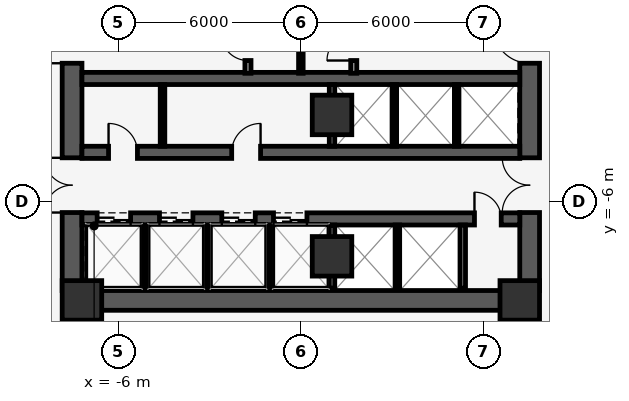
"""IFC4 building model, lengths in metres.
Left out: names, types, materials, properties, quantities, classifications, styles, units other than length and angle.
Written with IfcOpenShell. Run it as: python <this file> out.ifc"""

import sys

from ifc_helpers import new_model, si_unit, direction, frame, frame_2d, origin, origin_2d, place, context, subcontext, project, spatial, rectangle, extrude, element, fill, save


model = new_model("IFC4")
c1 = context("Model", 3, precision=1e-05, world=origin(), true_north=direction((0.0, 1.0)))
c2 = subcontext(c1, "Body", "Model", "MODEL_VIEW")
j1 = project(units=[si_unit("LENGTHUNIT", "METRE"), si_unit("PLANEANGLEUNIT", "RADIAN")], contexts=[c1])
p1 = place(None, origin())
s1 = spatial("IfcSite", under=j1, at=p1, CompositionType="ELEMENT")
p2 = place(p1, origin())
s2 = spatial("IfcBuilding", under=s1, at=p2, CompositionType="ELEMENT")
p3 = place(p2, frame((0.0, 0.0, 144.5)))
s3 = spatial("IfcBuildingStorey", under=s2, at=p3, CompositionType="ELEMENT", Elevation=144.5)
p4 = place(p3, frame((-7.525, -8.925, 0.0), z_axis=(0.0, 0.0, 1.0), x_axis=(0.0, 1.0, 0.0)))
e1 = element("IfcWall", 1, at=p4, inside=s3, PredefinedType="SHEAR", context=c2, shape_type="SweptSolid", body=[
    extrude(rectangle(XDim=9.025, YDim=0.65, at=frame_2d((4.513, 0.0))), origin(), (0.0, 0.0, 1.0), 3.85),
])
p5 = place(p4, frame((2.565, 0.0, 0.0)))
e2 = element("IfcOpeningElement", 2, at=p5, cuts=e1, PredefinedType="OPENING", context=c2, shape_type="SweptSolid", body=[
    extrude(rectangle(XDim=1.8, YDim=2.2, at=frame_2d((0.9, 1.1))), frame((0.0, 0.335, 0.0), z_axis=(0.0, -1.0, 0.0), x_axis=(1.0, 0.0, 0.0)), (0.0, 0.0, 1.0), 0.67),
])
p6 = place(p4, frame((7.475, 0.0, 0.0)))
e3 = element("IfcOpeningElement", 3, at=p6, cuts=e1, PredefinedType="OPENING", context=c2, shape_type="SweptSolid", body=[
    extrude(rectangle(XDim=1.2, YDim=2.15, at=frame_2d((0.6, 1.075))), frame((0.0, 0.335, 0.0), z_axis=(0.0, -1.0, 0.0), x_axis=(1.0, 0.0, 0.0)), (0.0, 0.0, 1.0), 0.67),
])
p7 = place(p3, frame((7.525, -8.925, 0.0), z_axis=(0.0, 0.0, 1.0), x_axis=(0.0, 1.0, 0.0)))
e4 = element("IfcWall", 4, at=p7, inside=s3, PredefinedType="SHEAR", context=c2, shape_type="SweptSolid", body=[
    extrude(rectangle(XDim=9.025, YDim=0.65, at=frame_2d((4.513, 0.0))), origin(), (0.0, 0.0, 1.0), 3.85),
])
p8 = place(p7, frame((2.565, 0.0, 0.0)))
e5 = element("IfcOpeningElement", 5, at=p8, cuts=e4, PredefinedType="OPENING", context=c2, shape_type="SweptSolid", body=[
    extrude(rectangle(XDim=1.8, YDim=2.2, at=frame_2d((0.9, 1.1))), frame((0.0, 0.335, 0.0), z_axis=(0.0, -1.0, 0.0), x_axis=(1.0, 0.0, 0.0)), (0.0, 0.0, 1.0), 0.67),
])
p9 = place(p7, frame((7.475, 0.0, 0.0)))
e6 = element("IfcOpeningElement", 6, at=p9, cuts=e4, PredefinedType="OPENING", context=c2, shape_type="SweptSolid", body=[
    extrude(rectangle(XDim=1.2, YDim=2.15, at=frame_2d((0.6, 1.075))), frame((0.0, 0.335, 0.0), z_axis=(0.0, -1.0, 0.0), x_axis=(1.0, 0.0, 0.0)), (0.0, 0.0, 1.0), 0.67),
])
p10 = place(p3, frame((-7.525, -9.25, 0.0), z_axis=(0.0, 0.0, 1.0), x_axis=(1.0, 0.0, 0.0)))
e7 = element("IfcWall", 7, at=p10, inside=s3, PredefinedType="SHEAR", context=c2, shape_type="SweptSolid", body=[
    extrude(rectangle(XDim=15.05, YDim=0.65, at=frame_2d((7.525, 0.0))), origin(), (0.0, 0.0, 1.0), 3.85),
])
p11 = place(p3, frame((-7.2, -1.95, 0.0), z_axis=(0.0, 0.0, 1.0), x_axis=(1.0, 0.0, 0.0)))
e8 = element("IfcWall", 8, at=p11, inside=s3, PredefinedType="SHEAR", context=c2, shape_type="SweptSolid", body=[
    extrude(rectangle(XDim=14.4, YDim=0.4, at=frame_2d((7.2, 0.0))), origin(), (0.0, 0.0, 1.0), 3.85),
])
p12 = place(p3, frame((-7.2, -4.38, 0.0), z_axis=(0.0, 0.0, 1.0), x_axis=(1.0, 0.0, 0.0)))
e9 = element("IfcWall", 9, at=p12, inside=s3, PredefinedType="SHEAR", context=c2, shape_type="SweptSolid", body=[
    extrude(rectangle(XDim=14.4, YDim=0.4, at=frame_2d((7.2, 0.0))), origin(), (0.0, 0.0, 1.0), 3.85),
])
p13 = place(p12, frame((0.875, 0.0, 0.0)))
e10 = element("IfcOpeningElement", 10, at=p13, cuts=e9, PredefinedType="OPENING", context=c2, shape_type="SweptSolid", body=[
    extrude(rectangle(XDim=0.95, YDim=2.15, at=frame_2d((0.475, 1.075))), frame((0.0, 0.21, 0.0), z_axis=(0.0, -1.0, 0.0), x_axis=(1.0, 0.0, 0.0)), (0.0, 0.0, 1.0), 0.42),
])
p14 = place(p12, frame((4.925, 0.0, 0.0)))
e11 = element("IfcOpeningElement", 11, at=p14, cuts=e9, PredefinedType="OPENING", context=c2, shape_type="SweptSolid", body=[
    extrude(rectangle(XDim=0.95, YDim=2.15, at=frame_2d((0.475, 1.075))), frame((0.0, 0.21, 0.0), z_axis=(0.0, -1.0, 0.0), x_axis=(1.0, 0.0, 0.0)), (0.0, 0.0, 1.0), 0.42),
])
p15 = place(p3, frame((-7.2, -6.57, 0.0), z_axis=(0.0, 0.0, 1.0), x_axis=(1.0, 0.0, 0.0)))
e12 = element("IfcWall", 12, at=p15, inside=s3, PredefinedType="SHEAR", context=c2, shape_type="SweptSolid", body=[
    extrude(rectangle(XDim=14.4, YDim=0.4, at=frame_2d((7.2, 0.0))), origin(), (0.0, 0.0, 1.0), 3.85),
])
p16 = place(p15, frame((0.5, 0.0, 0.0)))
e13 = element("IfcOpeningElement", 13, at=p16, cuts=e12, PredefinedType="OPENING", context=c2, shape_type="SweptSolid", body=[
    extrude(rectangle(XDim=1.1, YDim=2.2, at=frame_2d((0.55, 1.1))), frame((0.0, 0.21, 0.0), z_axis=(0.0, -1.0, 0.0), x_axis=(1.0, 0.0, 0.0)), (0.0, 0.0, 1.0), 0.42),
])
p17 = place(p15, frame((2.55, 0.0, 0.0)))
e14 = element("IfcOpeningElement", 14, at=p17, cuts=e12, PredefinedType="OPENING", context=c2, shape_type="SweptSolid", body=[
    extrude(rectangle(XDim=1.1, YDim=2.2, at=frame_2d((0.55, 1.1))), frame((0.0, 0.21, 0.0), z_axis=(0.0, -1.0, 0.0), x_axis=(1.0, 0.0, 0.0)), (0.0, 0.0, 1.0), 0.42),
])
p18 = place(p15, frame((4.6, 0.0, 0.0)))
e15 = element("IfcOpeningElement", 15, at=p18, cuts=e12, PredefinedType="OPENING", context=c2, shape_type="SweptSolid", body=[
    extrude(rectangle(XDim=1.1, YDim=2.2, at=frame_2d((0.55, 1.1))), frame((0.0, 0.21, 0.0), z_axis=(0.0, -1.0, 0.0), x_axis=(1.0, 0.0, 0.0)), (0.0, 0.0, 1.0), 0.42),
])
p19 = place(p15, frame((6.3, 0.0, 0.0)))
e16 = element("IfcOpeningElement", 16, at=p19, cuts=e12, PredefinedType="OPENING", context=c2, shape_type="SweptSolid", body=[
    extrude(rectangle(XDim=1.1, YDim=2.2, at=frame_2d((0.55, 1.1))), frame((0.0, 0.21, 0.0), z_axis=(0.0, -1.0, 0.0), x_axis=(1.0, 0.0, 0.0)), (0.0, 0.0, 1.0), 0.42),
])
p20 = place(p15, frame((12.91, 0.0, 0.0)))
e17 = element("IfcOpeningElement", 17, at=p20, cuts=e12, PredefinedType="OPENING", context=c2, shape_type="SweptSolid", body=[
    extrude(rectangle(XDim=0.88, YDim=2.15, at=frame_2d((0.44, 1.075))), frame((0.0, 0.21, 0.0), z_axis=(0.0, -1.0, 0.0), x_axis=(1.0, 0.0, 0.0)), (0.0, 0.0, 1.0), 0.42),
])
for number, where, z_axis, x_axis in (
    (18, (-7.2, -9.25, 0.0), (0.0, 0.0, 1.0), (1.0, 0.0, 0.0)),
    (19, (7.2, -9.25, 0.0), (0.0, 0.0, 1.0), (1.0, 0.0, 0.0)),
    (20, (1.025, -3.15, 0.0), (0.0, 0.0, 1.0), (1.0, 0.0, 0.0)),
    (21, (1.025, -7.8, 0.0), (0.0, 0.0, 1.0), (1.0, 0.0, 0.0)),
):
    element("IfcColumn", number, at=place(p3, frame(where, z_axis=z_axis, x_axis=x_axis)), inside=s3, PredefinedType="COLUMN", context=c2, shape_type="SweptSolid", body=[
        extrude(rectangle(XDim=1.3, YDim=1.3, at=origin_2d()), origin(), (0.0, 0.0, 1.0), 4.1),
    ])
p21 = place(p3, frame((-8.762, 34.748, 0.0), z_axis=(0.0, 0.0, 1.0), x_axis=(0.780669916438, -0.624943582708, 0.0)))
e22 = element("IfcWall", 22, at=p21, inside=s3, PredefinedType="STANDARD", context=c2, shape_type="SweptSolid", body=[
    extrude(rectangle(XDim=58.093, YDim=0.3, at=frame_2d((29.046, 0.0))), origin(), (0.0, 0.0, 1.0), 3.85),
])
p22 = place(p21, frame((5.947, 0.0, 0.85)))
e23 = element("IfcOpeningElement", 23, at=p22, cuts=e22, PredefinedType="OPENING", context=c2, shape_type="SweptSolid", body=[
    extrude(rectangle(XDim=1.4, YDim=2.2, at=frame_2d((0.7, 1.1))), frame((0.0, 0.16, 0.0), z_axis=(0.0, -1.0, 0.0), x_axis=(1.0, 0.0, 0.0)), (0.0, 0.0, 1.0), 0.32),
])
p23 = place(p21, frame((11.547, 0.0, 0.85)))
e24 = element("IfcOpeningElement", 24, at=p23, cuts=e22, PredefinedType="OPENING", context=c2, shape_type="SweptSolid", body=[
    extrude(rectangle(XDim=1.4, YDim=2.2, at=frame_2d((0.7, 1.1))), frame((0.0, 0.16, 0.0), z_axis=(0.0, -1.0, 0.0), x_axis=(1.0, 0.0, 0.0)), (0.0, 0.0, 1.0), 0.32),
])
p24 = place(p21, frame((17.146, 0.0, 0.85)))
e25 = element("IfcOpeningElement", 25, at=p24, cuts=e22, PredefinedType="OPENING", context=c2, shape_type="SweptSolid", body=[
    extrude(rectangle(XDim=1.4, YDim=2.2, at=frame_2d((0.7, 1.1))), frame((0.0, 0.16, 0.0), z_axis=(0.0, -1.0, 0.0), x_axis=(1.0, 0.0, 0.0)), (0.0, 0.0, 1.0), 0.32),
])
p25 = place(p21, frame((22.747, 0.0, 0.85)))
e26 = element("IfcOpeningElement", 26, at=p25, cuts=e22, PredefinedType="OPENING", context=c2, shape_type="SweptSolid", body=[
    extrude(rectangle(XDim=1.4, YDim=2.2, at=frame_2d((0.7, 1.1))), frame((0.0, 0.16, 0.0), z_axis=(0.0, -1.0, 0.0), x_axis=(1.0, 0.0, 0.0)), (0.0, 0.0, 1.0), 0.32),
])
p26 = place(p21, frame((28.347, 0.0, 0.85)))
e27 = element("IfcOpeningElement", 27, at=p26, cuts=e22, PredefinedType="OPENING", context=c2, shape_type="SweptSolid", body=[
    extrude(rectangle(XDim=1.4, YDim=2.2, at=frame_2d((0.7, 1.1))), frame((0.0, 0.16, 0.0), z_axis=(0.0, -1.0, 0.0), x_axis=(1.0, 0.0, 0.0)), (0.0, 0.0, 1.0), 0.32),
])
p27 = place(p21, frame((33.947, 0.0, 0.85)))
e28 = element("IfcOpeningElement", 28, at=p27, cuts=e22, PredefinedType="OPENING", context=c2, shape_type="SweptSolid", body=[
    extrude(rectangle(XDim=1.4, YDim=2.2, at=frame_2d((0.7, 1.1))), frame((0.0, 0.16, 0.0), z_axis=(0.0, -1.0, 0.0), x_axis=(1.0, 0.0, 0.0)), (0.0, 0.0, 1.0), 0.32),
])
p28 = place(p21, frame((39.547, 0.0, 0.85)))
e29 = element("IfcOpeningElement", 29, at=p28, cuts=e22, PredefinedType="OPENING", context=c2, shape_type="SweptSolid", body=[
    extrude(rectangle(XDim=1.4, YDim=2.2, at=frame_2d((0.7, 1.1))), frame((0.0, 0.16, 0.0), z_axis=(0.0, -1.0, 0.0), x_axis=(1.0, 0.0, 0.0)), (0.0, 0.0, 1.0), 0.32),
])
p29 = place(p21, frame((45.146, 0.0, 0.85)))
e30 = element("IfcOpeningElement", 30, at=p29, cuts=e22, PredefinedType="OPENING", context=c2, shape_type="SweptSolid", body=[
    extrude(rectangle(XDim=1.4, YDim=2.2, at=frame_2d((0.7, 1.1))), frame((0.0, 0.16, 0.0), z_axis=(0.0, -1.0, 0.0), x_axis=(1.0, 0.0, 0.0)), (0.0, 0.0, 1.0), 0.32),
])
p30 = place(p21, frame((50.747, 0.0, 0.85)))
e31 = element("IfcOpeningElement", 31, at=p30, cuts=e22, PredefinedType="OPENING", context=c2, shape_type="SweptSolid", body=[
    extrude(rectangle(XDim=1.4, YDim=2.2, at=frame_2d((0.7, 1.1))), frame((0.0, 0.16, 0.0), z_axis=(0.0, -1.0, 0.0), x_axis=(1.0, 0.0, 0.0)), (0.0, 0.0, 1.0), 0.32),
])
p31 = place(p3, frame((35.296, -9.873, 0.0), z_axis=(0.0, 0.0, 1.0), x_axis=(-0.933580612554, -0.35836746485, 0.0)))
e32 = element("IfcWall", 32, at=p31, inside=s3, PredefinedType="STANDARD", context=c2, shape_type="SweptSolid", body=[
    extrude(rectangle(XDim=58.828, YDim=0.3, at=frame_2d((29.414, 0.0))), origin(), (0.0, 0.0, 1.0), 3.85),
])
p32 = place(p31, frame((28.914, 0.0, 0.0)))
e33 = element("IfcOpeningElement", 33, at=p32, cuts=e32, PredefinedType="OPENING", context=c2, shape_type="SweptSolid", body=[
    extrude(rectangle(XDim=1.0, YDim=2.15, at=frame_2d((0.5, 1.075))), frame((0.0, 0.16, 0.0), z_axis=(0.0, -1.0, 0.0), x_axis=(1.0, 0.0, 0.0)), (0.0, 0.0, 1.0), 0.32),
])
p33 = place(p31, frame((6.314, 0.0, 0.85)))
e34 = element("IfcOpeningElement", 34, at=p33, cuts=e32, PredefinedType="OPENING", context=c2, shape_type="SweptSolid", body=[
    extrude(rectangle(XDim=1.4, YDim=2.2, at=frame_2d((0.7, 1.1))), frame((0.0, 0.16, 0.0), z_axis=(0.0, -1.0, 0.0), x_axis=(1.0, 0.0, 0.0)), (0.0, 0.0, 1.0), 0.32),
])
p34 = place(p31, frame((11.914, 0.0, 0.85)))
e35 = element("IfcOpeningElement", 35, at=p34, cuts=e32, PredefinedType="OPENING", context=c2, shape_type="SweptSolid", body=[
    extrude(rectangle(XDim=1.4, YDim=2.2, at=frame_2d((0.7, 1.1))), frame((0.0, 0.16, 0.0), z_axis=(0.0, -1.0, 0.0), x_axis=(1.0, 0.0, 0.0)), (0.0, 0.0, 1.0), 0.32),
])
p35 = place(p31, frame((34.314, 0.0, 0.85)))
e36 = element("IfcOpeningElement", 36, at=p35, cuts=e32, PredefinedType="OPENING", context=c2, shape_type="SweptSolid", body=[
    extrude(rectangle(XDim=1.4, YDim=2.2, at=frame_2d((0.7, 1.1))), frame((0.0, 0.16, 0.0), z_axis=(0.0, -1.0, 0.0), x_axis=(1.0, 0.0, 0.0)), (0.0, 0.0, 1.0), 0.32),
])
p36 = place(p31, frame((45.514, 0.0, 0.85)))
e37 = element("IfcOpeningElement", 37, at=p36, cuts=e32, PredefinedType="OPENING", context=c2, shape_type="SweptSolid", body=[
    extrude(rectangle(XDim=1.4, YDim=2.2, at=frame_2d((0.7, 1.1))), frame((0.0, 0.16, 0.0), z_axis=(0.0, -1.0, 0.0), x_axis=(1.0, 0.0, 0.0)), (0.0, 0.0, 1.0), 0.32),
])
p37 = place(p31, frame((51.114, 0.0, 0.85)))
e38 = element("IfcOpeningElement", 38, at=p37, cuts=e32, PredefinedType="OPENING", context=c2, shape_type="SweptSolid", body=[
    extrude(rectangle(XDim=1.4, YDim=2.2, at=frame_2d((0.7, 1.1))), frame((0.0, 0.16, 0.0), z_axis=(0.0, -1.0, 0.0), x_axis=(1.0, 0.0, 0.0)), (0.0, 0.0, 1.0), 0.32),
])
p38 = place(p3, frame((1.025, -4.18, 0.0), z_axis=(0.0, 0.0, 1.0), x_axis=(0.0, 1.0, 0.0)))
e39 = element("IfcWall", 39, at=p38, inside=s3, PredefinedType="PARTITIONING", context=c2, shape_type="SweptSolid", body=[
    extrude(rectangle(XDim=2.03, YDim=0.18, at=frame_2d((1.015, 0.0))), origin(), (0.0, 0.0, 1.0), 2.898),
])
for number, where, z_axis, x_axis in (
    (40, (-4.55, -4.18, 0.0), (0.0, 0.0, 1.0), (0.0, 1.0, 0.0)),
    (41, (3.075, -4.18, 0.0), (0.0, 0.0, 1.0), (0.0, 1.0, 0.0)),
    (42, (5.125, -4.18, 0.0), (0.0, 0.0, 1.0), (0.0, 1.0, 0.0)),
):
    element("IfcWall", number, at=place(p3, frame(where, z_axis=z_axis, x_axis=x_axis)), inside=s3, PredefinedType="PARTITIONING", context=c2, shape_type="SweptSolid", body=[
        extrude(rectangle(XDim=2.03, YDim=0.15, at=frame_2d((1.015, 0.0))), origin(), (0.0, 0.0, 1.0), 3.85),
    ])
for number, where, z_axis, x_axis in (
    (43, (-5.125, -8.85, 0.0), (0.0, 0.0, 1.0), (0.0, 1.0, 0.0)),
    (44, (-3.075, -8.85, 0.0), (0.0, 0.0, 1.0), (0.0, 1.0, 0.0)),
    (45, (-1.025, -8.85, 0.0), (0.0, 0.0, 1.0), (0.0, 1.0, 0.0)),
):
    element("IfcWall", number, at=place(p3, frame(where, z_axis=z_axis, x_axis=x_axis)), inside=s3, PredefinedType="PARTITIONING", context=c2, shape_type="SweptSolid", body=[
        extrude(rectangle(XDim=2.08, YDim=0.15, at=frame_2d((1.04, 0.0))), origin(), (0.0, 0.0, 1.0), 3.85),
    ])
p39 = place(p3, frame((1.025, -8.85, 0.0), z_axis=(0.0, 0.0, 1.0), x_axis=(0.0, 1.0, 0.0)))
e46 = element("IfcWall", 46, at=p39, inside=s3, PredefinedType="PARTITIONING", context=c2, shape_type="SweptSolid", body=[
    extrude(rectangle(XDim=2.08, YDim=0.18, at=frame_2d((1.04, 0.0))), origin(), (0.0, 0.0, 1.0), 2.898),
])
p40 = place(p3, frame((3.175, -8.85, 0.0), z_axis=(0.0, 0.0, 1.0), x_axis=(0.0, 1.0, 0.0)))
e47 = element("IfcWall", 47, at=p40, inside=s3, PredefinedType="PARTITIONING", context=c2, shape_type="SweptSolid", body=[
    extrude(rectangle(XDim=2.08, YDim=0.15, at=frame_2d((1.04, 0.0))), origin(), (0.0, 0.0, 1.0), 3.85),
])
p41 = place(p3, frame((5.325, -8.85, 0.0), z_axis=(0.0, 0.0, 1.0), x_axis=(0.0, 1.0, 0.0)))
e48 = element("IfcWall", 48, at=p41, inside=s3, PredefinedType="PARTITIONING", context=c2, shape_type="SweptSolid", body=[
    extrude(rectangle(XDim=2.08, YDim=0.18, at=frame_2d((1.04, 0.0))), origin(), (0.0, 0.0, 1.0), 3.85),
])
p42 = place(p3, frame((-1.74, -1.78, 0.0), z_axis=(0.0, 0.0, 1.0), x_axis=(0.0, 1.0, 0.0)))
e49 = element("IfcWall", 49, at=p42, inside=s3, PredefinedType="PARTITIONING", context=c2, shape_type="SweptSolid", body=[
    extrude(rectangle(XDim=2.98, YDim=0.2, at=frame_2d((1.49, 0.0))), origin(), (0.0, 0.0, 1.0), 3.85),
])
p43 = place(p42, frame((0.42, 0.0, 0.0)))
e50 = element("IfcOpeningElement", 50, at=p43, cuts=e49, PredefinedType="OPENING", context=c2, shape_type="SweptSolid", body=[
    extrude(rectangle(XDim=0.88, YDim=2.15, at=frame_2d((0.44, 1.075))), frame((0.0, 0.11, 0.0), z_axis=(0.0, -1.0, 0.0), x_axis=(1.0, 0.0, 0.0)), (0.0, 0.0, 1.0), 0.22),
])
p44 = place(p3, frame((1.74, -1.78, 0.0), z_axis=(0.0, 0.0, 1.0), x_axis=(0.0, 1.0, 0.0)))
e51 = element("IfcWall", 51, at=p44, inside=s3, PredefinedType="PARTITIONING", context=c2, shape_type="SweptSolid", body=[
    extrude(rectangle(XDim=2.98, YDim=0.2, at=frame_2d((1.49, 0.0))), origin(), (0.0, 0.0, 1.0), 3.85),
])
p45 = place(p44, frame((0.42, 0.0, 0.0)))
e52 = element("IfcOpeningElement", 52, at=p45, cuts=e51, PredefinedType="OPENING", context=c2, shape_type="SweptSolid", body=[
    extrude(rectangle(XDim=0.88, YDim=2.15, at=frame_2d((0.44, 1.075))), frame((0.0, 0.11, 0.0), z_axis=(0.0, -1.0, 0.0), x_axis=(1.0, 0.0, 0.0)), (0.0, 0.0, 1.0), 0.22),
])
p46 = place(p3, frame((0.0, -1.78, 0.0), z_axis=(0.0, 0.0, 1.0), x_axis=(0.0, 1.0, 0.0)))
e53 = element("IfcWall", 53, at=p46, inside=s3, PredefinedType="PARTITIONING", context=c2, shape_type="SweptSolid", body=[
    extrude(rectangle(XDim=1.73, YDim=0.15, at=frame_2d((0.865, 0.0))), origin(), (0.0, 0.0, 1.0), 3.85),
])
p47 = place(p16, origin())
e54 = element("IfcDoor", 54, at=p47, inside=s3, OperationType="DOUBLE_DOOR_SLIDING", PredefinedType="DOOR", context=c2, shape_type="SweptSolid", body=[
    extrude(rectangle(XDim=1.1, YDim=2.2, at=frame_2d((0.55, 1.1))), frame((0.0, 0.025, 0.0), z_axis=(0.0, -1.0, 0.0), x_axis=(1.0, 0.0, 0.0)), (0.0, 0.0, 1.0), 0.05),
])
fill(e13, e54)
p48 = place(p17, origin())
e55 = element("IfcDoor", 55, at=p48, inside=s3, OperationType="DOUBLE_DOOR_SLIDING", PredefinedType="DOOR", context=c2, shape_type="SweptSolid", body=[
    extrude(rectangle(XDim=1.1, YDim=2.2, at=frame_2d((0.55, 1.1))), frame((0.0, 0.025, 0.0), z_axis=(0.0, -1.0, 0.0), x_axis=(1.0, 0.0, 0.0)), (0.0, 0.0, 1.0), 0.05),
])
fill(e14, e55)
p49 = place(p18, origin())
e56 = element("IfcDoor", 56, at=p49, inside=s3, OperationType="DOUBLE_DOOR_SLIDING", PredefinedType="DOOR", context=c2, shape_type="SweptSolid", body=[
    extrude(rectangle(XDim=1.1, YDim=2.2, at=frame_2d((0.55, 1.1))), frame((0.0, 0.025, 0.0), z_axis=(0.0, -1.0, 0.0), x_axis=(1.0, 0.0, 0.0)), (0.0, 0.0, 1.0), 0.05),
])
fill(e15, e56)
p50 = place(p19, origin())
e57 = element("IfcDoor", 57, at=p50, inside=s3, OperationType="DOUBLE_DOOR_SLIDING", PredefinedType="DOOR", context=c2, shape_type="SweptSolid", body=[
    extrude(rectangle(XDim=1.1, YDim=2.2, at=frame_2d((0.55, 1.1))), frame((0.0, 0.025, 0.0), z_axis=(0.0, -1.0, 0.0), x_axis=(1.0, 0.0, 0.0)), (0.0, 0.0, 1.0), 0.05),
])
fill(e16, e57)
p51 = place(p5, origin())
e58 = element("IfcDoor", 58, at=p51, inside=s3, OperationType="DOUBLE_DOOR_SINGLE_SWING", PredefinedType="DOOR", context=c2, shape_type="SweptSolid", body=[
    extrude(rectangle(XDim=1.8, YDim=2.2, at=frame_2d((0.9, 1.1))), frame((0.0, 0.025, 0.0), z_axis=(0.0, -1.0, 0.0), x_axis=(1.0, 0.0, 0.0)), (0.0, 0.0, 1.0), 0.05),
])
fill(e2, e58)
p52 = place(p6, origin())
e59 = element("IfcDoor", 59, at=p52, inside=s3, OperationType="SINGLE_SWING_LEFT", PredefinedType="DOOR", context=c2, shape_type="SweptSolid", body=[
    extrude(rectangle(XDim=1.2, YDim=2.15, at=frame_2d((0.6, 1.075))), frame((0.0, 0.025, 0.0), z_axis=(0.0, -1.0, 0.0), x_axis=(1.0, 0.0, 0.0)), (0.0, 0.0, 1.0), 0.05),
])
fill(e3, e59)
p53 = place(p8, origin())
e60 = element("IfcDoor", 60, at=p53, inside=s3, OperationType="DOUBLE_DOOR_SINGLE_SWING", PredefinedType="DOOR", context=c2, shape_type="SweptSolid", body=[
    extrude(rectangle(XDim=1.8, YDim=2.2, at=frame_2d((0.9, 1.1))), frame((0.0, 0.025, 0.0), z_axis=(0.0, -1.0, 0.0), x_axis=(1.0, 0.0, 0.0)), (0.0, 0.0, 1.0), 0.05),
])
fill(e5, e60)
p54 = place(p9, origin())
e61 = element("IfcDoor", 61, at=p54, inside=s3, OperationType="SINGLE_SWING_RIGHT", PredefinedType="DOOR", context=c2, shape_type="SweptSolid", body=[
    extrude(rectangle(XDim=1.2, YDim=2.15, at=frame_2d((0.6, 1.075))), frame((0.0, 0.025, 0.0), z_axis=(0.0, -1.0, 0.0), x_axis=(1.0, 0.0, 0.0)), (0.0, 0.0, 1.0), 0.05),
])
fill(e6, e61)
p55 = place(p13, origin())
e62 = element("IfcDoor", 62, at=p55, inside=s3, OperationType="SINGLE_SWING_LEFT", PredefinedType="DOOR", context=c2, shape_type="SweptSolid", body=[
    extrude(rectangle(XDim=0.95, YDim=2.15, at=frame_2d((0.475, 1.075))), frame((0.0, 0.025, 0.0), z_axis=(0.0, -1.0, 0.0), x_axis=(1.0, 0.0, 0.0)), (0.0, 0.0, 1.0), 0.05),
])
fill(e10, e62)
p56 = place(p14, origin())
e63 = element("IfcDoor", 63, at=p56, inside=s3, OperationType="SINGLE_SWING_RIGHT", PredefinedType="DOOR", context=c2, shape_type="SweptSolid", body=[
    extrude(rectangle(XDim=0.95, YDim=2.15, at=frame_2d((0.475, 1.075))), frame((0.0, 0.025, 0.0), z_axis=(0.0, -1.0, 0.0), x_axis=(1.0, 0.0, 0.0)), (0.0, 0.0, 1.0), 0.05),
])
fill(e11, e63)
p57 = place(p20, origin())
e64 = element("IfcDoor", 64, at=p57, inside=s3, OperationType="SINGLE_SWING_LEFT", PredefinedType="DOOR", context=c2, shape_type="SweptSolid", body=[
    extrude(rectangle(XDim=0.88, YDim=2.15, at=frame_2d((0.44, 1.075))), frame((0.0, 0.025, 0.0), z_axis=(0.0, -1.0, 0.0), x_axis=(1.0, 0.0, 0.0)), (0.0, 0.0, 1.0), 0.05),
])
fill(e17, e64)
p58 = place(p43, origin())
e65 = element("IfcDoor", 65, at=p58, inside=s3, OperationType="SINGLE_SWING_RIGHT", PredefinedType="DOOR", context=c2, shape_type="SweptSolid", body=[
    extrude(rectangle(XDim=0.88, YDim=2.15, at=frame_2d((0.44, 1.075))), frame((0.0, 0.025, 0.0), z_axis=(0.0, -1.0, 0.0), x_axis=(1.0, 0.0, 0.0)), (0.0, 0.0, 1.0), 0.05),
])
fill(e50, e65)
p59 = place(p45, origin())
e66 = element("IfcDoor", 66, at=p59, inside=s3, OperationType="SINGLE_SWING_LEFT", PredefinedType="DOOR", context=c2, shape_type="SweptSolid", body=[
    extrude(rectangle(XDim=0.88, YDim=2.15, at=frame_2d((0.44, 1.075))), frame((0.0, 0.025, 0.0), z_axis=(0.0, -1.0, 0.0), x_axis=(1.0, 0.0, 0.0)), (0.0, 0.0, 1.0), 0.05),
])
fill(e52, e66)
save(model, sys.argv[1])
